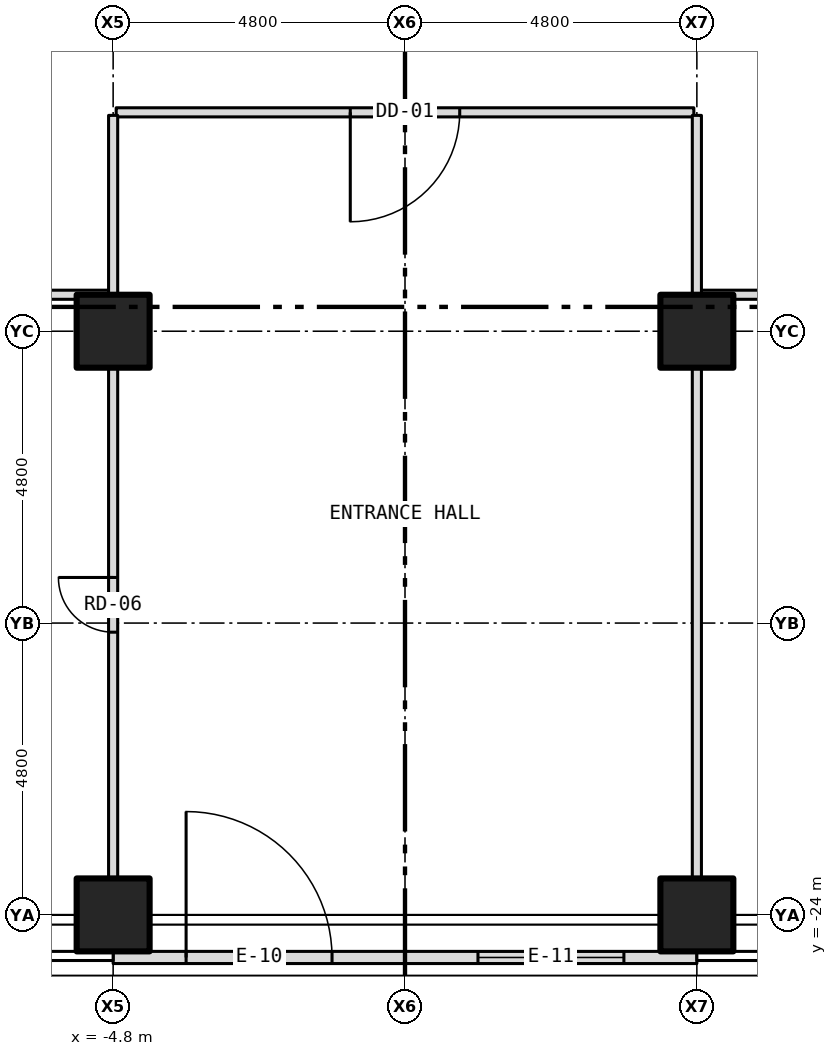
"""IFC4 building model, lengths in metres.
Left out: names, types, materials, properties, quantities, classifications, styles, units other than length and angle.
Written with IfcOpenShell. Run it as: python <this file> out.ifc"""

import sys

from ifc_helpers import new_model, si_unit, direction, frame, frame_2d, origin, origin_2d, place, context, subcontext, project, spatial, rectangle, hollow_rectangle, extrude, element, fill, save


model = new_model("IFC4")
c1 = context("Model", 3, precision=1e-05, world=origin(), true_north=direction((0.0, 1.0)))
c2 = subcontext(c1, "Body", "Model", "MODEL_VIEW")
j1 = project(units=[si_unit("LENGTHUNIT", "METRE"), si_unit("PLANEANGLEUNIT", "RADIAN")], contexts=[c1])
p1 = place(None, origin())
s1 = spatial("IfcSite", under=j1, at=p1, CompositionType="ELEMENT")
p2 = place(p1, origin())
s2 = spatial("IfcBuilding", under=s1, at=p2, CompositionType="ELEMENT")
p3 = place(p2, origin())
s3 = spatial("IfcBuildingStorey", under=s2, at=p3, CompositionType="ELEMENT", Elevation=0.0)
for number, where, z_axis, x_axis in (
    (1, (-4.8, -24.0, -0.3), (0.0, 0.0, 1.0), (1.0, 0.0, 0.0)),
    (2, (4.8, -24.0, -0.3), (0.0, 0.0, 1.0), (1.0, 0.0, 0.0)),
    (3, (-4.8, -14.4, -0.3), (0.0, 0.0, 1.0), (1.0, 0.0, 0.0)),
    (4, (4.8, -14.4, -0.3), (0.0, 0.0, 1.0), (1.0, 0.0, 0.0)),
):
    element("IfcColumn", number, at=place(p3, frame(where, z_axis=z_axis, x_axis=x_axis)), inside=s3, PredefinedType="COLUMN", context=c2, shape_type="SweptSolid", body=[
        extrude(hollow_rectangle(XDim=1.2, YDim=1.2, WallThickness=0.07, at=origin_2d()), origin(), (0.0, 0.0, 1.0), 7.55),
    ])
p4 = place(p3, frame((-4.8, -24.7, -0.2), z_axis=(0.0, 0.0, 1.0), x_axis=(1.0, 0.0, 0.0)))
e5 = element("IfcWall", 5, at=p4, inside=s3, PredefinedType="SOLIDWALL", context=c2, shape_type="SweptSolid", body=[
    extrude(rectangle(XDim=9.6, YDim=0.2, at=frame_2d((4.8, 0.0))), origin(), (0.0, 0.0, 1.0), 7.7),
])
p5 = place(p4, frame((1.2, 0.0, 0.2)))
e6 = element("IfcOpeningElement", 6, at=p5, cuts=e5, PredefinedType="OPENING", context=c2, shape_type="SweptSolid", body=[
    extrude(rectangle(XDim=2.4, YDim=2.5, at=frame_2d((1.2, 1.25))), frame((0.0, 0.112, 0.0), z_axis=(0.0, -1.0, 0.0), x_axis=(1.0, 0.0, 0.0)), (0.0, 0.0, 1.0), 0.224),
])
p6 = place(p4, frame((6.0, 0.0, 0.2)))
e7 = element("IfcOpeningElement", 7, at=p6, cuts=e5, PredefinedType="OPENING", context=c2, shape_type="SweptSolid", body=[
    extrude(rectangle(XDim=2.4, YDim=2.7, at=frame_2d((1.2, 1.35))), frame((0.0, 0.112, 0.0), z_axis=(0.0, -1.0, 0.0), x_axis=(1.0, 0.0, 0.0)), (0.0, 0.0, 1.0), 0.224),
])
p7 = place(p3, frame((-27.0, -13.8, 0.0), z_axis=(0.0, 0.0, 1.0), x_axis=(1.0, 0.0, 0.0)))
e8 = element("IfcWall", 8, at=p7, inside=s3, PredefinedType="PARTITIONING", context=c2, shape_type="SweptSolid", body=[
    extrude(rectangle(XDim=22.2, YDim=0.15, at=frame_2d((11.1, 0.0))), origin(), (0.0, 0.0, 1.0), 7.25),
])
p8 = place(p7, frame((9.03, 0.0, 0.0)))
e9 = element("IfcOpeningElement", 9, at=p8, cuts=e8, PredefinedType="OPENING", context=c2, shape_type="SweptSolid", body=[
    extrude(rectangle(XDim=0.9, YDim=2.1, at=frame_2d((0.45, 1.05))), frame((0.0, 0.087, 0.0), z_axis=(0.0, -1.0, 0.0), x_axis=(1.0, 0.0, 0.0)), (0.0, 0.0, 1.0), 0.174),
])
p9 = place(p7, frame((11.08, 0.0, 0.0)))
e10 = element("IfcOpeningElement", 10, at=p9, cuts=e8, PredefinedType="OPENING", context=c2, shape_type="SweptSolid", body=[
    extrude(rectangle(XDim=0.9, YDim=2.1, at=frame_2d((0.45, 1.05))), frame((0.0, 0.087, 0.0), z_axis=(0.0, -1.0, 0.0), x_axis=(1.0, 0.0, 0.0)), (0.0, 0.0, 1.0), 0.174),
])
p10 = place(p7, frame((1.138, 0.0, 0.0)))
e11 = element("IfcOpeningElement", 11, at=p10, cuts=e8, PredefinedType="OPENING", context=c2, shape_type="SweptSolid", body=[
    extrude(rectangle(XDim=0.9, YDim=2.1, at=frame_2d((0.45, 1.05))), frame((0.0, 0.087, 0.0), z_axis=(0.0, -1.0, 0.0), x_axis=(1.0, 0.0, 0.0)), (0.0, 0.0, 1.0), 0.174),
])
p11 = place(p7, frame((5.039, 0.0, 0.0)))
e12 = element("IfcOpeningElement", 12, at=p11, cuts=e8, PredefinedType="OPENING", context=c2, shape_type="SweptSolid", body=[
    extrude(rectangle(XDim=0.9, YDim=2.1, at=frame_2d((0.45, 1.05))), frame((0.0, 0.087, 0.0), z_axis=(0.0, -1.0, 0.0), x_axis=(1.0, 0.0, 0.0)), (0.0, 0.0, 1.0), 0.174),
])
p12 = place(p3, frame((4.8, -13.8, 0.0), z_axis=(0.0, 0.0, 1.0), x_axis=(1.0, 0.0, 0.0)))
e13 = element("IfcWall", 13, at=p12, inside=s3, PredefinedType="PARTITIONING", context=c2, shape_type="SweptSolid", body=[
    extrude(rectangle(XDim=22.2, YDim=0.15, at=frame_2d((11.1, 0.0))), origin(), (0.0, 0.0, 1.0), 7.25),
])
p13 = place(p12, frame((8.036, 0.0, 0.0)))
e14 = element("IfcOpeningElement", 14, at=p13, cuts=e13, PredefinedType="OPENING", context=c2, shape_type="SweptSolid", body=[
    extrude(rectangle(XDim=0.9, YDim=2.1, at=frame_2d((0.45, 1.05))), frame((0.0, 0.087, 0.0), z_axis=(0.0, -1.0, 0.0), x_axis=(1.0, 0.0, 0.0)), (0.0, 0.0, 1.0), 0.174),
])
p14 = place(p12, frame((16.5, 0.0, 0.0)))
e15 = element("IfcOpeningElement", 15, at=p14, cuts=e13, PredefinedType="OPENING", context=c2, shape_type="SweptSolid", body=[
    extrude(rectangle(XDim=1.8, YDim=2.1, at=frame_2d((0.9, 1.05))), frame((0.0, 0.087, 0.0), z_axis=(0.0, -1.0, 0.0), x_axis=(1.0, 0.0, 0.0)), (0.0, 0.0, 1.0), 0.174),
])
p15 = place(p3, frame((-4.75, -10.8, 0.0), z_axis=(0.0, 0.0, 1.0), x_axis=(1.0, 0.0, 0.0)))
e16 = element("IfcWall", 16, at=p15, inside=s3, PredefinedType="PARTITIONING", context=c2, shape_type="SweptSolid", body=[
    extrude(rectangle(XDim=9.5, YDim=0.15, at=frame_2d((4.75, 0.0))), origin(), (0.0, 0.0, 1.0), 7.25),
])
p16 = place(p15, frame((3.85, 0.0, 0.0)))
e17 = element("IfcOpeningElement", 17, at=p16, cuts=e16, PredefinedType="OPENING", context=c2, shape_type="SweptSolid", body=[
    extrude(rectangle(XDim=1.8, YDim=2.1, at=frame_2d((0.9, 1.05))), frame((0.0, 0.087, 0.0), z_axis=(0.0, -1.0, 0.0), x_axis=(1.0, 0.0, 0.0)), (0.0, 0.0, 1.0), 0.174),
])
p17 = place(p3, frame((-4.8, -23.88, 0.0), z_axis=(0.0, 0.0, 1.0), x_axis=(0.0, 1.0, 0.0)))
e18 = element("IfcWall", 18, at=p17, inside=s3, PredefinedType="PARTITIONING", context=c2, shape_type="SweptSolid", body=[
    extrude(rectangle(XDim=0.48, YDim=0.15, at=frame_2d((0.24, 0.0))), origin(), (0.0, 0.0, 1.0), 7.25),
])
p18 = place(p3, frame((-4.8, -23.4, 0.0), z_axis=(0.0, 0.0, 1.0), x_axis=(0.0, 1.0, 0.0)))
e19 = element("IfcWall", 19, at=p18, inside=s3, PredefinedType="PARTITIONING", context=c2, shape_type="SweptSolid", body=[
    extrude(rectangle(XDim=8.4, YDim=0.15, at=frame_2d((4.2, 0.0))), origin(), (0.0, 0.0, 1.0), 6.323),
])
p19 = place(p18, frame((4.05, 0.0, 0.0)))
e20 = element("IfcOpeningElement", 20, at=p19, cuts=e19, PredefinedType="OPENING", context=c2, shape_type="SweptSolid", body=[
    extrude(rectangle(XDim=0.9, YDim=2.1, at=frame_2d((0.45, 1.05))), frame((0.0, 0.087, 0.0), z_axis=(0.0, -1.0, 0.0), x_axis=(1.0, 0.0, 0.0)), (0.0, 0.0, 1.0), 0.174),
])
p20 = place(p3, frame((-4.8, -15.0, 0.0), z_axis=(0.0, 0.0, 1.0), x_axis=(0.0, 1.0, 0.0)))
e21 = element("IfcWall", 21, at=p20, inside=s3, PredefinedType="PARTITIONING", context=c2, shape_type="SweptSolid", body=[
    extrude(rectangle(XDim=1.2, YDim=0.15, at=frame_2d((0.6, 0.0))), origin(), (0.0, 0.0, 1.0), 7.25),
])
p21 = place(p3, frame((-4.8, -13.8, 0.0), z_axis=(0.0, 0.0, 1.0), x_axis=(0.0, 1.0, 0.0)))
e22 = element("IfcWall", 22, at=p21, inside=s3, PredefinedType="PARTITIONING", context=c2, shape_type="SweptSolid", body=[
    extrude(rectangle(XDim=2.95, YDim=0.15, at=frame_2d((1.475, 0.0))), origin(), (0.0, 0.0, 1.0), 6.323),
])
p22 = place(p3, frame((4.8, -23.88, 0.0), z_axis=(0.0, 0.0, 1.0), x_axis=(0.0, 1.0, 0.0)))
e23 = element("IfcWall", 23, at=p22, inside=s3, PredefinedType="PARTITIONING", context=c2, shape_type="SweptSolid", body=[
    extrude(rectangle(XDim=0.48, YDim=0.15, at=frame_2d((0.24, 0.0))), origin(), (0.0, 0.0, 1.0), 7.25),
])
p23 = place(p3, frame((4.8, -23.4, 0.0), z_axis=(0.0, 0.0, 1.0), x_axis=(0.0, 1.0, 0.0)))
e24 = element("IfcWall", 24, at=p23, inside=s3, PredefinedType="PARTITIONING", context=c2, shape_type="SweptSolid", body=[
    extrude(rectangle(XDim=8.4, YDim=0.15, at=frame_2d((4.2, 0.0))), origin(), (0.0, 0.0, 1.0), 6.323),
])
p24 = place(p3, frame((4.8, -15.0, 0.0), z_axis=(0.0, 0.0, 1.0), x_axis=(0.0, 1.0, 0.0)))
e25 = element("IfcWall", 25, at=p24, inside=s3, PredefinedType="PARTITIONING", context=c2, shape_type="SweptSolid", body=[
    extrude(rectangle(XDim=1.2, YDim=0.15, at=frame_2d((0.6, 0.0))), origin(), (0.0, 0.0, 1.0), 7.25),
])
p25 = place(p3, frame((4.8, -13.8, 0.0), z_axis=(0.0, 0.0, 1.0), x_axis=(0.0, 1.0, 0.0)))
e26 = element("IfcWall", 26, at=p25, inside=s3, PredefinedType="PARTITIONING", context=c2, shape_type="SweptSolid", body=[
    extrude(rectangle(XDim=2.95, YDim=0.15, at=frame_2d((1.475, 0.0))), origin(), (0.0, 0.0, 1.0), 6.323),
])
p26 = place(p5, origin())
e27 = element("IfcDoor", 27, at=p26, inside=s3, OperationType="DOUBLE_DOOR_DOUBLE_SWING", PredefinedType="DOOR", context=c2, shape_type="SweptSolid", body=[
    extrude(rectangle(XDim=2.4, YDim=2.5, at=frame_2d((1.2, 1.25))), frame((0.0, 0.025, 0.0), z_axis=(0.0, -1.0, 0.0), x_axis=(1.0, 0.0, 0.0)), (0.0, 0.0, 1.0), 0.05),
])
fill(e6, e27)
p27 = place(p6, origin())
e28 = element("IfcDoor", 28, at=p27, inside=s3, OperationType="DOUBLE_DOOR_SLIDING", PredefinedType="DOOR", context=c2, shape_type="SweptSolid", body=[
    extrude(rectangle(XDim=2.4, YDim=2.7, at=frame_2d((1.2, 1.35))), frame((0.0, 0.025, 0.0), z_axis=(0.0, -1.0, 0.0), x_axis=(1.0, 0.0, 0.0)), (0.0, 0.0, 1.0), 0.05),
])
fill(e7, e28)
p28 = place(p16, origin())
e29 = element("IfcDoor", 29, at=p28, inside=s3, OperationType="DOUBLE_DOOR_SINGLE_SWING", PredefinedType="DOOR", context=c2, shape_type="SweptSolid", body=[
    extrude(rectangle(XDim=1.8, YDim=2.1, at=frame_2d((0.9, 1.05))), frame((0.0, 0.025, 0.0), z_axis=(0.0, -1.0, 0.0), x_axis=(1.0, 0.0, 0.0)), (0.0, 0.0, 1.0), 0.05),
])
fill(e17, e29)
p29 = place(p19, origin())
e30 = element("IfcDoor", 30, at=p29, inside=s3, OperationType="SINGLE_SWING_RIGHT", PredefinedType="DOOR", context=c2, shape_type="SweptSolid", body=[
    extrude(rectangle(XDim=0.9, YDim=2.1, at=frame_2d((0.45, 1.05))), frame((0.0, 0.025, 0.0), z_axis=(0.0, -1.0, 0.0), x_axis=(1.0, 0.0, 0.0)), (0.0, 0.0, 1.0), 0.05),
])
fill(e20, e30)
save(model, sys.argv[1])
